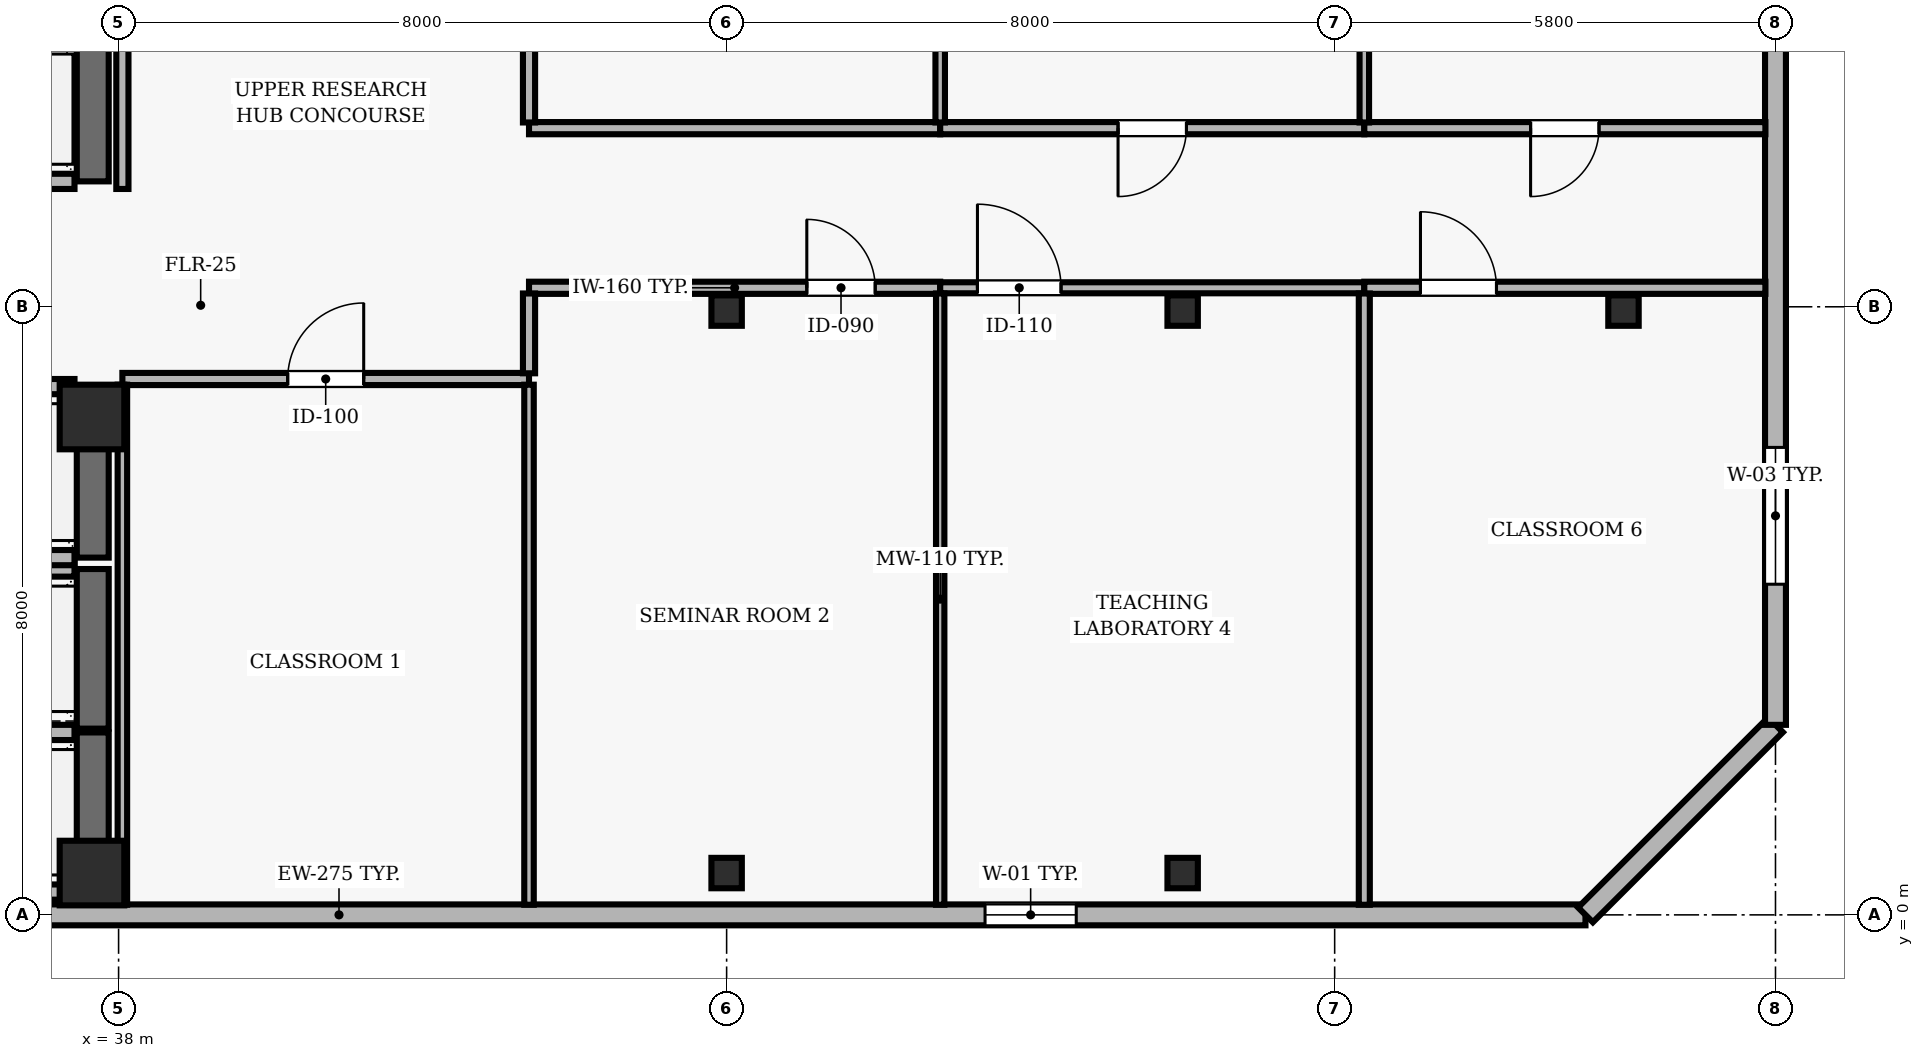
"""IFC4 building model, lengths in metres.
Left out: names, types, materials, properties, quantities, classifications, styles, units other than length and angle.
Written with IfcOpenShell. Run it as: python <this file> out.ifc"""

import sys

from ifc_helpers import new_model, si_unit, direction, frame, frame_2d, origin, origin_2d, place, context, subcontext, project, spatial, rectangle, hollow_rectangle, extrude, element, fill, save


model = new_model("IFC4")
c1 = context("Model", 3, precision=1e-05, world=origin(), true_north=direction((0.0, 1.0)))
c2 = subcontext(c1, "Body", "Model", "MODEL_VIEW")
j1 = project(units=[si_unit("LENGTHUNIT", "METRE"), si_unit("PLANEANGLEUNIT", "RADIAN")], contexts=[c1])
p1 = place(None, origin())
s1 = spatial("IfcSite", under=j1, at=p1, CompositionType="ELEMENT")
p2 = place(p1, origin())
s2 = spatial("IfcBuilding", under=s1, at=p2, CompositionType="ELEMENT")
p3 = place(p2, frame((0.0, 0.0, 248.2)))
s3 = spatial("IfcBuildingStorey", under=s2, at=p3, CompositionType="ELEMENT", Elevation=248.2)
for number, where, z_axis, x_axis in (
    (1, (37.65, 0.55, 0.0), (0.0, 0.0, 1.0), (1.0, 0.0, 0.0)),
    (2, (37.65, 6.55, 0.0), (0.0, 0.0, 1.0), (1.0, 0.0, 0.0)),
):
    element("IfcColumn", number, at=place(p3, frame(where, z_axis=z_axis, x_axis=x_axis)), inside=s3, PredefinedType="COLUMN", context=c2, shape_type="SweptSolid", body=[
        extrude(rectangle(XDim=0.85, YDim=0.85, at=origin_2d()), origin(), (0.0, 0.0, 1.0), 3.9),
    ])
for number, where, z_axis, x_axis in (
    (3, (46.0, 0.55, 0.0), (0.0, 0.0, 1.0), (1.0, 0.0, 0.0)),
    (4, (46.0, 7.95, 0.0), (0.0, 0.0, 1.0), (1.0, 0.0, 0.0)),
    (5, (52.0, 0.55, 0.0), (0.0, 0.0, 1.0), (1.0, 0.0, 0.0)),
    (6, (52.0, 7.95, 0.0), (0.0, 0.0, 1.0), (1.0, 0.0, 0.0)),
    (7, (57.8, 7.95, 0.0), (0.0, 0.0, 1.0), (1.0, 0.0, 0.0)),
):
    element("IfcColumn", number, at=place(p3, frame(where, z_axis=z_axis, x_axis=x_axis)), inside=s3, PredefinedType="COLUMN", context=c2, shape_type="SweptSolid", body=[
        extrude(hollow_rectangle(XDim=0.4, YDim=0.4, WallThickness=0.02, at=origin_2d()), origin(), (0.0, 0.0, 1.0), 3.9),
    ])
p4 = place(p3, frame((24.5, 0.0, 0.0), z_axis=(0.0, 0.0, 1.0), x_axis=(1.0, 0.0, 0.0)))
e8 = element("IfcWall", 8, at=p4, inside=s3, PredefinedType="SOLIDWALL", context=c2, shape_type="SweptSolid", body=[
    extrude(rectangle(XDim=32.8, YDim=0.275, at=frame_2d((16.4, 0.0))), origin(), (0.0, 0.0, 1.0), 3.69),
])
p5 = place(p4, frame((2.133, 0.0, 0.9)))
e9 = element("IfcOpeningElement", 9, at=p5, cuts=e8, PredefinedType="OPENING", context=c2, shape_type="SweptSolid", body=[
    extrude(rectangle(XDim=1.2, YDim=1.6, at=frame_2d((0.6, 0.8))), frame((0.0, 0.147, 0.0), z_axis=(0.0, -1.0, 0.0), x_axis=(1.0, 0.0, 0.0)), (0.0, 0.0, 1.0), 0.295),
])
p6 = place(p4, frame((8.05, 0.0, 0.9)))
e10 = element("IfcOpeningElement", 10, at=p6, cuts=e8, PredefinedType="OPENING", context=c2, shape_type="SweptSolid", body=[
    extrude(rectangle(XDim=1.2, YDim=1.6, at=frame_2d((0.6, 0.8))), frame((0.0, 0.147, 0.0), z_axis=(0.0, -1.0, 0.0), x_axis=(1.0, 0.0, 0.0)), (0.0, 0.0, 1.0), 0.295),
])
p7 = place(p4, frame((24.9, 0.0, 0.9)))
e11 = element("IfcOpeningElement", 11, at=p7, cuts=e8, PredefinedType="OPENING", context=c2, shape_type="SweptSolid", body=[
    extrude(rectangle(XDim=1.2, YDim=1.6, at=frame_2d((0.6, 0.8))), frame((0.0, 0.147, 0.0), z_axis=(0.0, -1.0, 0.0), x_axis=(1.0, 0.0, 0.0)), (0.0, 0.0, 1.0), 0.295),
])
p8 = place(p3, frame((57.3, 0.0, 0.0), z_axis=(0.0, 0.0, 1.0), x_axis=(0.707106781187, 0.707106781187, 0.0)))
e12 = element("IfcWall", 12, at=p8, inside=s3, PredefinedType="SOLIDWALL", context=c2, shape_type="SweptSolid", body=[
    extrude(rectangle(XDim=3.536, YDim=0.275, at=frame_2d((1.768, 0.0))), origin(), (0.0, 0.0, 1.0), 3.69),
])
p9 = place(p3, frame((59.8, 2.5, 0.0), z_axis=(0.0, 0.0, 1.0), x_axis=(0.0, 1.0, 0.0)))
e13 = element("IfcWall", 13, at=p9, inside=s3, PredefinedType="SOLIDWALL", context=c2, shape_type="SweptSolid", body=[
    extrude(rectangle(XDim=11.0, YDim=0.275, at=frame_2d((5.5, 0.0))), origin(), (0.0, 0.0, 1.0), 3.69),
])
p10 = place(p9, frame((1.85, 0.0, 0.9)))
e14 = element("IfcOpeningElement", 14, at=p10, cuts=e13, PredefinedType="OPENING", context=c2, shape_type="SweptSolid", body=[
    extrude(rectangle(XDim=1.8, YDim=1.6, at=frame_2d((0.9, 0.8))), frame((0.0, 0.147, 0.0), z_axis=(0.0, -1.0, 0.0), x_axis=(1.0, 0.0, 0.0)), (0.0, 0.0, 1.0), 0.295),
])
p11 = place(p3, frame((37.66, 0.3, 0.0), z_axis=(0.0, 0.0, 1.0), x_axis=(0.0, 1.0, 0.0)))
e15 = element("IfcWall", 15, at=p11, inside=s3, PredefinedType="SHEAR", context=c2, shape_type="SweptSolid", body=[
    extrude(rectangle(XDim=2.1, YDim=0.42, at=frame_2d((1.05, 0.0))), origin(), (0.0, 0.0, 1.0), 3.69),
])
for number, where, z_axis, x_axis in (
    (16, (35.28, 0.3, 0.0), (0.0, 0.0, 1.0), (1.0, 0.0, 0.0)),
    (17, (37.42, 2.4, 0.0), (0.0, 0.0, 1.0), (-1.0, 0.0, 0.0)),
):
    element("IfcWall", number, at=place(p3, frame(where, z_axis=z_axis, x_axis=x_axis)), inside=s3, PredefinedType="SOLIDWALL", context=c2, shape_type="SweptSolid", body=[
        extrude(rectangle(XDim=2.14, YDim=0.2, at=frame_2d((1.07, 0.0))), origin(), (0.0, 0.0, 1.0), 3.69),
    ])
p12 = place(p3, frame((37.66, 2.45, 0.0), z_axis=(0.0, 0.0, 1.0), x_axis=(0.0, 1.0, 0.0)))
e18 = element("IfcWall", 18, at=p12, inside=s3, PredefinedType="SHEAR", context=c2, shape_type="SweptSolid", body=[
    extrude(rectangle(XDim=2.1, YDim=0.42, at=frame_2d((1.05, 0.0))), origin(), (0.0, 0.0, 1.0), 3.69),
])
p13 = place(p3, frame((37.42, 4.55, 0.0), z_axis=(0.0, 0.0, 1.0), x_axis=(-1.0, 0.0, 0.0)))
e19 = element("IfcWall", 19, at=p13, inside=s3, PredefinedType="SOLIDWALL", context=c2, shape_type="SweptSolid", body=[
    extrude(rectangle(XDim=2.14, YDim=0.2, at=frame_2d((1.07, 0.0))), origin(), (0.0, 0.0, 1.0), 3.69),
])
p14 = place(p3, frame((37.66, 4.7, 0.0), z_axis=(0.0, 0.0, 1.0), x_axis=(0.0, 1.0, 0.0)))
e20 = element("IfcWall", 20, at=p14, inside=s3, PredefinedType="SHEAR", context=c2, shape_type="SweptSolid", body=[
    extrude(rectangle(XDim=2.25, YDim=0.42, at=frame_2d((1.125, 0.0))), origin(), (0.0, 0.0, 1.0), 3.69),
])
for number, where, z_axis, x_axis in (
    (21, (35.28, 4.7, 0.0), (0.0, 0.0, 1.0), (1.0, 0.0, 0.0)),
    (22, (37.42, 6.95, 0.0), (0.0, 0.0, 1.0), (-1.0, 0.0, 0.0)),
):
    element("IfcWall", number, at=place(p3, frame(where, z_axis=z_axis, x_axis=x_axis)), inside=s3, PredefinedType="SOLIDWALL", context=c2, shape_type="SweptSolid", body=[
        extrude(rectangle(XDim=2.14, YDim=0.2, at=frame_2d((1.07, 0.0))), origin(), (0.0, 0.0, 1.0), 3.69),
    ])
p15 = place(p3, frame((37.66, 9.65, 0.0), z_axis=(0.0, 0.0, 1.0), x_axis=(0.0, 1.0, 0.0)))
e23 = element("IfcWall", 23, at=p15, inside=s3, PredefinedType="SHEAR", context=c2, shape_type="SweptSolid", body=[
    extrude(rectangle(XDim=1.9, YDim=0.42, at=frame_2d((0.95, 0.0))), origin(), (0.0, 0.0, 1.0), 3.69),
])
p16 = place(p3, frame((35.28, 9.65, 0.0), z_axis=(0.0, 0.0, 1.0), x_axis=(1.0, 0.0, 0.0)))
e24 = element("IfcWall", 24, at=p16, inside=s3, PredefinedType="SOLIDWALL", context=c2, shape_type="SweptSolid", body=[
    extrude(rectangle(XDim=2.14, YDim=0.2, at=frame_2d((1.07, 0.0))), origin(), (0.0, 0.0, 1.0), 3.69),
])
p17 = place(p3, frame((38.05, 7.05, 0.0), z_axis=(0.0, 0.0, 1.0), x_axis=(1.0, 0.0, 0.0)))
e25 = element("IfcWall", 25, at=p17, inside=s3, PredefinedType="PARTITIONING", context=c2, shape_type="SweptSolid", body=[
    extrude(rectangle(XDim=5.35, YDim=0.16, at=frame_2d((2.675, 0.0))), origin(), (0.0, 0.0, 1.0), 3.69),
])
p18 = place(p17, frame((2.175, 0.0, 0.0)))
e26 = element("IfcOpeningElement", 26, at=p18, cuts=e25, PredefinedType="OPENING", context=c2, shape_type="SweptSolid", body=[
    extrude(rectangle(XDim=1.0, YDim=2.1, at=frame_2d((0.5, 1.05))), frame((0.0, 0.09, 0.0), z_axis=(0.0, -1.0, 0.0), x_axis=(1.0, 0.0, 0.0)), (0.0, 0.0, 1.0), 0.18),
])
p19 = place(p3, frame((43.4, 8.25, 0.0), z_axis=(0.0, 0.0, 1.0), x_axis=(1.0, 0.0, 0.0)))
e27 = element("IfcWall", 27, at=p19, inside=s3, PredefinedType="PARTITIONING", context=c2, shape_type="SweptSolid", body=[
    extrude(rectangle(XDim=5.41, YDim=0.16, at=frame_2d((2.705, 0.0))), origin(), (0.0, 0.0, 1.0), 3.221),
])
p20 = place(p19, frame((3.655, 0.0, 0.0)))
e28 = element("IfcOpeningElement", 28, at=p20, cuts=e27, PredefinedType="OPENING", context=c2, shape_type="SweptSolid", body=[
    extrude(rectangle(XDim=0.9, YDim=2.1, at=frame_2d((0.45, 1.05))), frame((0.0, 0.09, 0.0), z_axis=(0.0, -1.0, 0.0), x_axis=(1.0, 0.0, 0.0)), (0.0, 0.0, 1.0), 0.18),
])
p21 = place(p3, frame((48.81, 8.25, 0.0), z_axis=(0.0, 0.0, 1.0), x_axis=(1.0, 0.0, 0.0)))
e29 = element("IfcWall", 29, at=p21, inside=s3, PredefinedType="PARTITIONING", context=c2, shape_type="SweptSolid", body=[
    extrude(rectangle(XDim=5.58, YDim=0.145, at=frame_2d((2.79, 0.0))), origin(), (0.0, 0.0, 1.0), 3.221),
])
p22 = place(p21, frame((0.49, 0.0, 0.0)))
e30 = element("IfcOpeningElement", 30, at=p22, cuts=e29, PredefinedType="OPENING", context=c2, shape_type="SweptSolid", body=[
    extrude(rectangle(XDim=1.1, YDim=2.15, at=frame_2d((0.55, 1.075))), frame((0.0, 0.083, 0.0), z_axis=(0.0, -1.0, 0.0), x_axis=(1.0, 0.0, 0.0)), (0.0, 0.0, 1.0), 0.165),
])
p23 = place(p3, frame((48.81, 10.35, 0.0), z_axis=(0.0, 0.0, 1.0), x_axis=(-1.0, 0.0, 0.0)))
e31 = element("IfcWall", 31, at=p23, inside=s3, PredefinedType="PARTITIONING", context=c2, shape_type="SweptSolid", body=[
    extrude(rectangle(XDim=5.41, YDim=0.16, at=frame_2d((2.705, 0.0))), origin(), (0.0, 0.0, 1.0), 3.372),
])
p24 = place(p3, frame((54.39, 8.25, 0.0), z_axis=(0.0, 0.0, 1.0), x_axis=(1.0, 0.0, 0.0)))
e32 = element("IfcWall", 32, at=p24, inside=s3, PredefinedType="PARTITIONING", context=c2, shape_type="SweptSolid", body=[
    extrude(rectangle(XDim=5.277, YDim=0.16, at=frame_2d((2.639, 0.0))), origin(), (0.0, 0.0, 1.0), 3.221),
])
p25 = place(p24, frame((0.739, 0.0, 0.0)))
e33 = element("IfcOpeningElement", 33, at=p25, cuts=e32, PredefinedType="OPENING", context=c2, shape_type="SweptSolid", body=[
    extrude(rectangle(XDim=1.0, YDim=2.1, at=frame_2d((0.5, 1.05))), frame((0.0, 0.09, 0.0), z_axis=(0.0, -1.0, 0.0), x_axis=(1.0, 0.0, 0.0)), (0.0, 0.0, 1.0), 0.18),
])
p26 = place(p3, frame((54.39, 10.35, 0.0), z_axis=(0.0, 0.0, 1.0), x_axis=(-1.0, 0.0, 0.0)))
e34 = element("IfcWall", 34, at=p26, inside=s3, PredefinedType="PARTITIONING", context=c2, shape_type="SweptSolid", body=[
    extrude(rectangle(XDim=5.58, YDim=0.16, at=frame_2d((2.79, 0.0))), origin(), (0.0, 0.0, 1.0), 3.372),
])
p27 = place(p26, frame((2.34, 0.0, 0.0)))
e35 = element("IfcOpeningElement", 35, at=p27, cuts=e34, PredefinedType="OPENING", context=c2, shape_type="SweptSolid", body=[
    extrude(rectangle(XDim=0.9, YDim=2.1, at=frame_2d((0.45, 1.05))), frame((0.0, 0.09, 0.0), z_axis=(0.0, -1.0, 0.0), x_axis=(1.0, 0.0, 0.0)), (0.0, 0.0, 1.0), 0.18),
])
p28 = place(p3, frame((59.667, 10.35, 0.0), z_axis=(0.0, 0.0, 1.0), x_axis=(-1.0, 0.0, 0.0)))
e36 = element("IfcWall", 36, at=p28, inside=s3, PredefinedType="PARTITIONING", context=c2, shape_type="SweptSolid", body=[
    extrude(rectangle(XDim=5.277, YDim=0.16, at=frame_2d((2.639, 0.0))), origin(), (0.0, 0.0, 1.0), 3.372),
])
p29 = place(p28, frame((2.189, 0.0, 0.0)))
e37 = element("IfcOpeningElement", 37, at=p29, cuts=e36, PredefinedType="OPENING", context=c2, shape_type="SweptSolid", body=[
    extrude(rectangle(XDim=0.9, YDim=2.1, at=frame_2d((0.45, 1.05))), frame((0.0, 0.09, 0.0), z_axis=(0.0, -1.0, 0.0), x_axis=(1.0, 0.0, 0.0)), (0.0, 0.0, 1.0), 0.18),
])
p30 = place(p3, frame((38.05, 6.975, 0.0), z_axis=(0.0, 0.0, 1.0), x_axis=(0.0, -1.0, 0.0)))
e38 = element("IfcWall", 38, at=p30, inside=s3, PredefinedType="PARTITIONING", context=c2, shape_type="SweptSolid", body=[
    extrude(rectangle(XDim=6.842, YDim=0.125, at=frame_2d((3.421, 0.0))), origin(), (0.0, 0.0, 1.0), 3.221),
])
p31 = place(p3, frame((38.05, 15.925, 0.0), z_axis=(0.0, 0.0, 1.0), x_axis=(0.0, -1.0, 0.0)))
e39 = element("IfcWall", 39, at=p31, inside=s3, PredefinedType="PARTITIONING", context=c2, shape_type="SweptSolid", body=[
    extrude(rectangle(XDim=6.375, YDim=0.16, at=frame_2d((3.188, 0.0))), origin(), (0.0, 0.0, 1.0), 3.221),
])
p32 = place(p3, frame((43.4, 0.133, 0.0), z_axis=(0.0, 0.0, 1.0), x_axis=(0.0, 1.0, 0.0)))
e40 = element("IfcWall", 40, at=p32, inside=s3, PredefinedType="PARTITIONING", context=c2, shape_type="SweptSolid", body=[
    extrude(rectangle(XDim=6.842, YDim=0.125, at=frame_2d((3.421, 0.0))), origin(), (0.0, 0.0, 1.0), 3.69),
])
p33 = place(p3, frame((43.4, 7.125, 0.0), z_axis=(0.0, 0.0, 1.0), x_axis=(0.0, 1.0, 0.0)))
e41 = element("IfcWall", 41, at=p33, inside=s3, PredefinedType="PARTITIONING", context=c2, shape_type="SweptSolid", body=[
    extrude(rectangle(XDim=1.05, YDim=0.16, at=frame_2d((0.525, 0.0))), origin(), (0.0, 0.0, 1.0), 3.69),
])
p34 = place(p3, frame((43.4, 10.425, 0.0), z_axis=(0.0, 0.0, 1.0), x_axis=(0.0, 1.0, 0.0)))
e42 = element("IfcWall", 42, at=p34, inside=s3, PredefinedType="PARTITIONING", context=c2, shape_type="SweptSolid", body=[
    extrude(rectangle(XDim=5.5, YDim=0.16, at=frame_2d((2.75, 0.0))), origin(), (0.0, 0.0, 1.0), 3.69),
])
p35 = place(p34, frame((2.25, 0.0, 0.0)))
e43 = element("IfcOpeningElement", 43, at=p35, cuts=e42, PredefinedType="OPENING", context=c2, shape_type="SweptSolid", body=[
    extrude(rectangle(XDim=1.0, YDim=2.1, at=frame_2d((0.5, 1.05))), frame((0.0, 0.09, 0.0), z_axis=(0.0, -1.0, 0.0), x_axis=(1.0, 0.0, 0.0)), (0.0, 0.0, 1.0), 0.18),
])
p36 = place(p3, frame((48.81, 0.133, 0.0), z_axis=(0.0, 0.0, 1.0), x_axis=(0.0, 1.0, 0.0)))
e44 = element("IfcWall", 44, at=p36, inside=s3, PredefinedType="MOVABLE", context=c2, shape_type="SweptSolid", body=[
    extrude(rectangle(XDim=8.042, YDim=0.11, at=frame_2d((4.021, 0.0))), origin(), (0.0, 0.0, 1.0), 3.69),
])
p37 = place(p3, frame((48.81, 10.425, 0.0), z_axis=(0.0, 0.0, 1.0), x_axis=(0.0, 1.0, 0.0)))
e45 = element("IfcWall", 45, at=p37, inside=s3, PredefinedType="PARTITIONING", context=c2, shape_type="SweptSolid", body=[
    extrude(rectangle(XDim=5.442, YDim=0.125, at=frame_2d((2.721, 0.0))), origin(), (0.0, 0.0, 1.0), 3.69),
])
p38 = place(p3, frame((54.39, 0.133, 0.0), z_axis=(0.0, 0.0, 1.0), x_axis=(0.0, 1.0, 0.0)))
e46 = element("IfcWall", 46, at=p38, inside=s3, PredefinedType="PARTITIONING", context=c2, shape_type="SweptSolid", body=[
    extrude(rectangle(XDim=8.042, YDim=0.145, at=frame_2d((4.021, 0.0))), origin(), (0.0, 0.0, 1.0), 3.69),
])
p39 = place(p3, frame((54.39, 10.425, 0.0), z_axis=(0.0, 0.0, 1.0), x_axis=(0.0, 1.0, 0.0)))
e47 = element("IfcWall", 47, at=p39, inside=s3, PredefinedType="PARTITIONING", context=c2, shape_type="SweptSolid", body=[
    extrude(rectangle(XDim=5.442, YDim=0.125, at=frame_2d((2.721, 0.0))), origin(), (0.0, 0.0, 1.0), 3.69),
])
p40 = place(p7, origin())
e48 = element("IfcWindow", 48, at=p40, inside=s3, PartitioningType="SINGLE_PANEL", PredefinedType="WINDOW", context=c2, shape_type="SweptSolid", body=[
    extrude(rectangle(XDim=1.2, YDim=1.6, at=frame_2d((0.6, 0.8))), frame((0.0, 0.03, 0.0), z_axis=(0.0, -1.0, 0.0), x_axis=(1.0, 0.0, 0.0)), (0.0, 0.0, 1.0), 0.06),
])
fill(e11, e48)
p41 = place(p10, origin())
e49 = element("IfcWindow", 49, at=p41, inside=s3, PartitioningType="SINGLE_PANEL", PredefinedType="WINDOW", context=c2, shape_type="SweptSolid", body=[
    extrude(rectangle(XDim=1.8, YDim=1.6, at=frame_2d((0.9, 0.8))), frame((0.0, 0.03, 0.0), z_axis=(0.0, -1.0, 0.0), x_axis=(1.0, 0.0, 0.0)), (0.0, 0.0, 1.0), 0.06),
])
fill(e14, e49)
p42 = place(p18, origin())
e50 = element("IfcDoor", 50, at=p42, inside=s3, OperationType="SINGLE_SWING_RIGHT", PredefinedType="DOOR", context=c2, shape_type="SweptSolid", body=[
    extrude(rectangle(XDim=1.0, YDim=2.1, at=frame_2d((0.5, 1.05))), frame((0.0, 0.025, 0.0), z_axis=(0.0, -1.0, 0.0), x_axis=(1.0, 0.0, 0.0)), (0.0, 0.0, 1.0), 0.05),
])
fill(e26, e50)
p43 = place(p20, origin())
e51 = element("IfcDoor", 51, at=p43, inside=s3, OperationType="SINGLE_SWING_LEFT", PredefinedType="DOOR", context=c2, shape_type="SweptSolid", body=[
    extrude(rectangle(XDim=0.9, YDim=2.1, at=frame_2d((0.45, 1.05))), frame((0.0, 0.025, 0.0), z_axis=(0.0, -1.0, 0.0), x_axis=(1.0, 0.0, 0.0)), (0.0, 0.0, 1.0), 0.05),
])
fill(e28, e51)
p44 = place(p22, origin())
e52 = element("IfcDoor", 52, at=p44, inside=s3, OperationType="SINGLE_SWING_LEFT", PredefinedType="DOOR", context=c2, shape_type="SweptSolid", body=[
    extrude(rectangle(XDim=1.1, YDim=2.15, at=frame_2d((0.55, 1.075))), frame((0.0, 0.025, 0.0), z_axis=(0.0, -1.0, 0.0), x_axis=(1.0, 0.0, 0.0)), (0.0, 0.0, 1.0), 0.05),
])
fill(e30, e52)
p45 = place(p27, origin())
e53 = element("IfcDoor", 53, at=p45, inside=s3, OperationType="SINGLE_SWING_RIGHT", PredefinedType="DOOR", context=c2, shape_type="SweptSolid", body=[
    extrude(rectangle(XDim=0.9, YDim=2.1, at=frame_2d((0.45, 1.05))), frame((0.0, 0.025, 0.0), z_axis=(0.0, -1.0, 0.0), x_axis=(1.0, 0.0, 0.0)), (0.0, 0.0, 1.0), 0.05),
])
fill(e35, e53)
p46 = place(p25, origin())
e54 = element("IfcDoor", 54, at=p46, inside=s3, OperationType="SINGLE_SWING_LEFT", PredefinedType="DOOR", context=c2, shape_type="SweptSolid", body=[
    extrude(rectangle(XDim=1.0, YDim=2.1, at=frame_2d((0.5, 1.05))), frame((0.0, 0.025, 0.0), z_axis=(0.0, -1.0, 0.0), x_axis=(1.0, 0.0, 0.0)), (0.0, 0.0, 1.0), 0.05),
])
fill(e33, e54)
p47 = place(p29, origin())
e55 = element("IfcDoor", 55, at=p47, inside=s3, OperationType="SINGLE_SWING_RIGHT", PredefinedType="DOOR", context=c2, shape_type="SweptSolid", body=[
    extrude(rectangle(XDim=0.9, YDim=2.1, at=frame_2d((0.45, 1.05))), frame((0.0, 0.025, 0.0), z_axis=(0.0, -1.0, 0.0), x_axis=(1.0, 0.0, 0.0)), (0.0, 0.0, 1.0), 0.05),
])
fill(e37, e55)
save(model, sys.argv[1])
